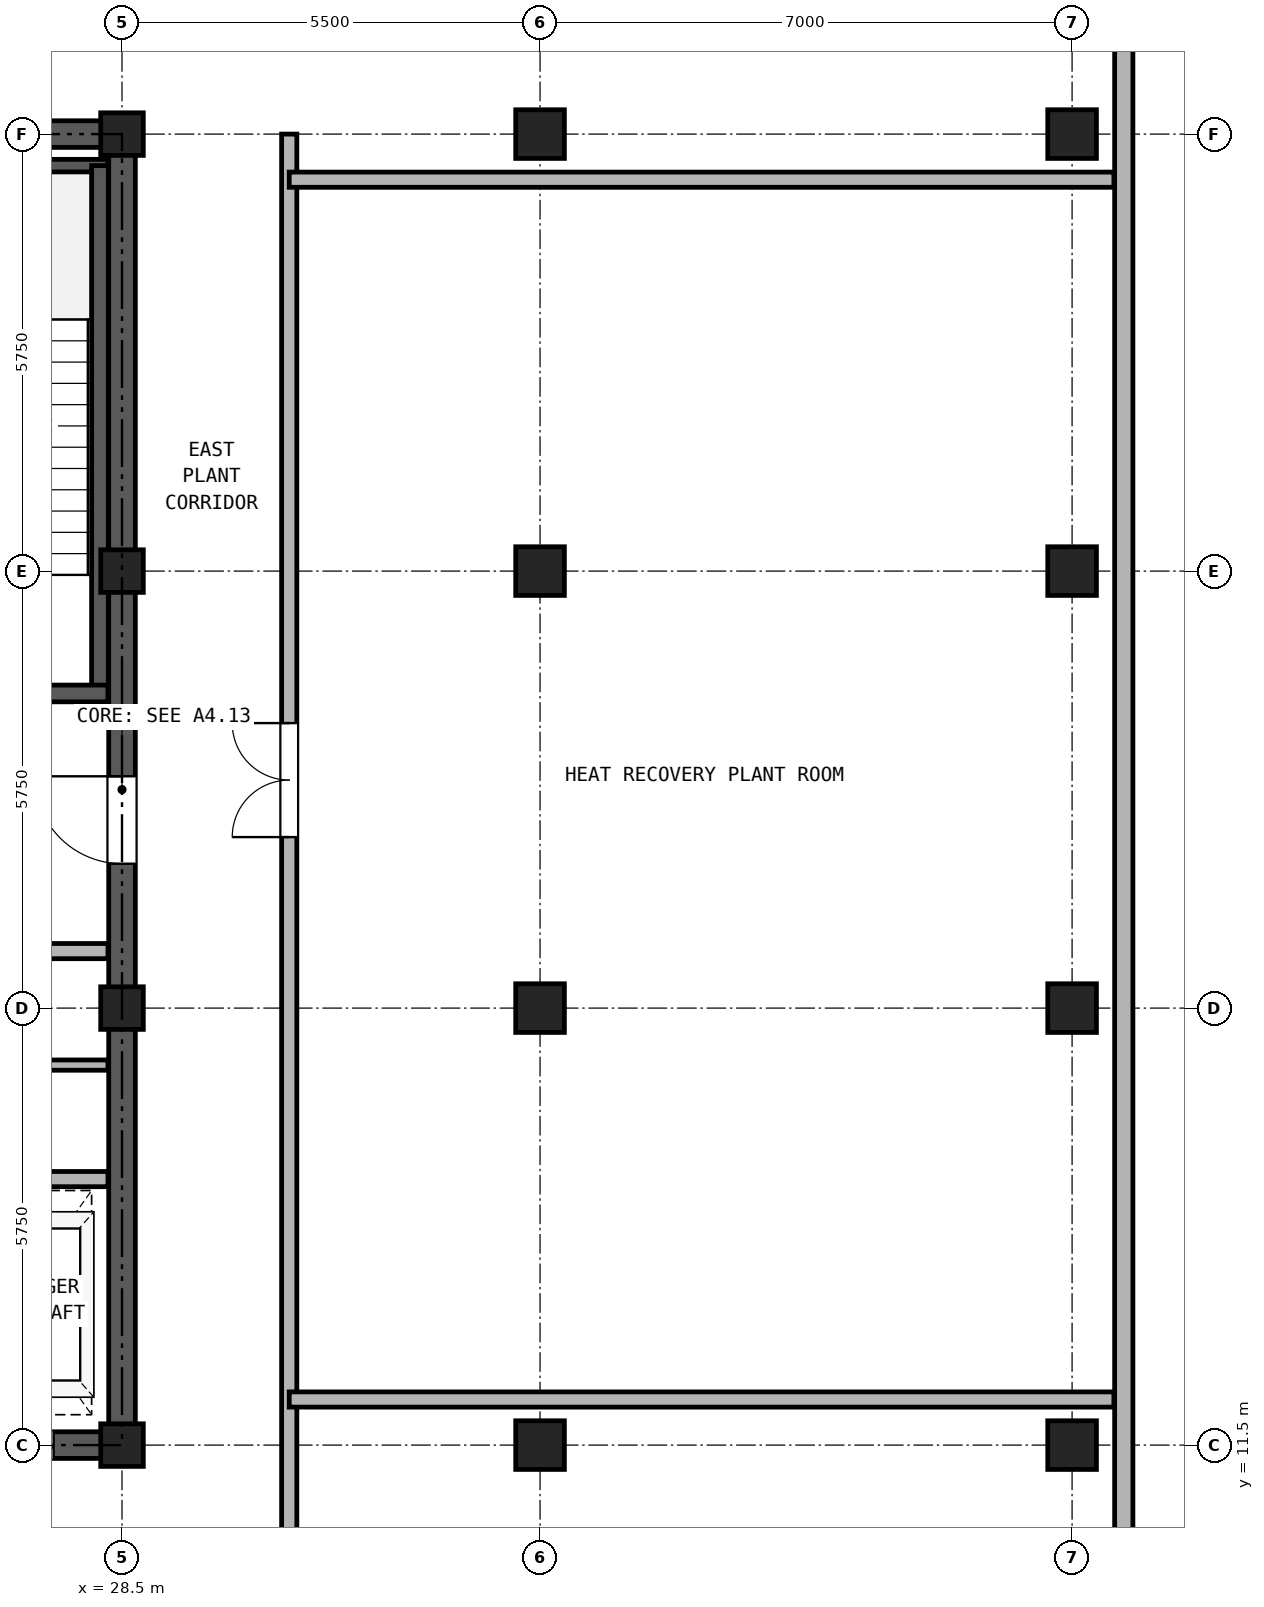
"""IFC4 building model, lengths in metres.
Left out: names, types, materials, properties, quantities, classifications, styles, units other than length and angle.
Written with IfcOpenShell. Run it as: python <this file> out.ifc"""

import sys

from ifc_helpers import new_model, si_unit, direction, frame, frame_2d, origin, origin_2d, place, context, subcontext, project, spatial, rectangle, hollow_rectangle, extrude, source, transform, mapped, element, fill, save


model = new_model("IFC4")
c1 = context("Model", 3, precision=1e-05, world=origin(), true_north=direction((0.0, 1.0)))
c2 = subcontext(c1, "Body", "Model", "MODEL_VIEW")
j1 = project(units=[si_unit("LENGTHUNIT", "METRE"), si_unit("PLANEANGLEUNIT", "RADIAN")], contexts=[c1])
p1 = place(None, origin())
s1 = spatial("IfcSite", under=j1, at=p1, CompositionType="ELEMENT")
p2 = place(p1, origin())
s2 = spatial("IfcBuilding", under=s1, at=p2, CompositionType="ELEMENT")
p3 = place(p2, frame((0.0, 0.0, 215.6)))
s3 = spatial("IfcBuildingStorey", under=s2, at=p3, CompositionType="ELEMENT", Elevation=215.6)
m1 = source(origin(), c2, "Body", "SweptSolid", [
    extrude(hollow_rectangle(XDim=0.64, YDim=0.64, WallThickness=0.035, at=origin_2d()), origin(), (0.0, 0.0, 1.0), 4.28),
])
for number, where, z_axis, x_axis in (
    (1, (41.0, 11.5, 0.0), (0.0, 0.0, 1.0), (1.0, 0.0, 0.0)),
    (2, (41.0, 17.25, 0.0), (0.0, 0.0, 1.0), (1.0, 0.0, 0.0)),
    (3, (41.0, 23.0, 0.0), (0.0, 0.0, 1.0), (1.0, 0.0, 0.0)),
    (4, (41.0, 28.75, 0.0), (0.0, 0.0, 1.0), (1.0, 0.0, 0.0)),
):
    element("IfcColumn", number, at=place(p3, frame(where, z_axis=z_axis, x_axis=x_axis)), inside=s3, PredefinedType="COLUMN", context=c2, shape_type="MappedRepresentation", body=[
        mapped(m1, transform((0.0, 0.0, 0.0), x_axis=(1.0, 0.0, 0.0), y_axis=(0.0, 1.0, 0.0), z_axis=(0.0, 0.0, 1.0), scale=1.0)),
    ])
m2 = source(origin(), c2, "Body", "SweptSolid", [
    extrude(hollow_rectangle(XDim=0.56, YDim=0.56, WallThickness=0.03, at=origin_2d()), origin(), (0.0, 0.0, 1.0), 4.28),
])
for number, where, z_axis, x_axis in (
    (5, (28.5, 11.5, 0.0), (0.0, 0.0, 1.0), (1.0, 0.0, 0.0)),
    (6, (28.5, 17.25, 0.0), (0.0, 0.0, 1.0), (1.0, 0.0, 0.0)),
    (7, (28.5, 23.0, 0.0), (0.0, 0.0, 1.0), (1.0, 0.0, 0.0)),
    (8, (28.5, 28.75, 0.0), (0.0, 0.0, 1.0), (1.0, 0.0, 0.0)),
):
    element("IfcColumn", number, at=place(p3, frame(where, z_axis=z_axis, x_axis=x_axis)), inside=s3, PredefinedType="COLUMN", context=c2, shape_type="MappedRepresentation", body=[
        mapped(m2, transform((0.0, 0.0, 0.0), x_axis=(1.0, 0.0, 0.0), y_axis=(0.0, 1.0, 0.0), z_axis=(0.0, 0.0, 1.0), scale=1.0)),
    ])
for number, where, z_axis, x_axis in (
    (9, (34.0, 11.5, 0.0), (0.0, 0.0, 1.0), (1.0, 0.0, 0.0)),
    (10, (34.0, 17.25, 0.0), (0.0, 0.0, 1.0), (1.0, 0.0, 0.0)),
    (11, (34.0, 23.0, 0.0), (0.0, 0.0, 1.0), (1.0, 0.0, 0.0)),
    (12, (34.0, 28.75, 0.0), (0.0, 0.0, 1.0), (1.0, 0.0, 0.0)),
):
    element("IfcColumn", number, at=place(p3, frame(where, z_axis=z_axis, x_axis=x_axis)), inside=s3, PredefinedType="COLUMN", context=c2, shape_type="MappedRepresentation", body=[
        mapped(m1, transform((0.0, 0.0, 0.0), x_axis=(1.0, 0.0, 0.0), y_axis=(0.0, 1.0, 0.0), z_axis=(0.0, 0.0, 1.0), scale=1.0)),
    ])
p4 = place(p3, frame((41.68, 3.5, 0.0), z_axis=(0.0, 0.0, 1.0), x_axis=(0.0, 1.0, 0.0)))
e13 = element("IfcWall", 13, at=p4, inside=s3, PredefinedType="SOLIDWALL", context=c2, shape_type="SweptSolid", body=[
    extrude(rectangle(XDim=28.3, YDim=0.24, at=frame_2d((14.15, 0.0))), origin(), (0.0, 0.0, 1.0), 4.28),
])
p5 = place(p3, frame((18.325, 11.5, 0.0), z_axis=(0.0, 0.0, 1.0), x_axis=(1.0, 0.0, 0.0)))
e14 = element("IfcWall", 14, at=p5, inside=s3, PredefinedType="SHEAR", context=c2, shape_type="SweptSolid", body=[
    extrude(rectangle(XDim=10.35, YDim=0.35, at=frame_2d((5.175, 0.0))), origin(), (0.0, 0.0, 1.0), 4.28),
])
p6 = place(p5, frame((1.775, 0.0, 0.0)))
e15 = element("IfcOpeningElement", 15, at=p6, cuts=e14, PredefinedType="OPENING", context=c2, shape_type="SweptSolid", body=[
    extrude(rectangle(XDim=0.95, YDim=2.15, at=frame_2d((0.475, 1.075))), frame((0.0, 0.185, 0.0), z_axis=(0.0, -1.0, 0.0), x_axis=(1.0, 0.0, 0.0)), (0.0, 0.0, 1.0), 0.37),
])
p7 = place(p5, frame((5.275, 0.0, 0.0)))
e16 = element("IfcOpeningElement", 16, at=p7, cuts=e14, PredefinedType="OPENING", context=c2, shape_type="SweptSolid", body=[
    extrude(rectangle(XDim=0.95, YDim=2.15, at=frame_2d((0.475, 1.075))), frame((0.0, 0.185, 0.0), z_axis=(0.0, -1.0, 0.0), x_axis=(1.0, 0.0, 0.0)), (0.0, 0.0, 1.0), 0.37),
])
p8 = place(p5, frame((8.175, 0.0, 0.0)))
e17 = element("IfcOpeningElement", 17, at=p8, cuts=e14, PredefinedType="OPENING", context=c2, shape_type="SweptSolid", body=[
    extrude(rectangle(XDim=1.1, YDim=2.25, at=frame_2d((0.55, 1.125))), frame((0.0, 0.185, 0.0), z_axis=(0.0, -1.0, 0.0), x_axis=(1.0, 0.0, 0.0)), (0.0, 0.0, 1.0), 0.37),
])
p9 = place(p3, frame((18.325, 28.75, 0.0), z_axis=(0.0, 0.0, 1.0), x_axis=(1.0, 0.0, 0.0)))
e18 = element("IfcWall", 18, at=p9, inside=s3, PredefinedType="SHEAR", context=c2, shape_type="SweptSolid", body=[
    extrude(rectangle(XDim=10.35, YDim=0.35, at=frame_2d((5.175, 0.0))), origin(), (0.0, 0.0, 1.0), 4.28),
])
p10 = place(p9, frame((4.055, 0.0, 0.0)))
e19 = element("IfcOpeningElement", 19, at=p10, cuts=e18, PredefinedType="OPENING", context=c2, shape_type="SweptSolid", body=[
    extrude(rectangle(XDim=0.9, YDim=2.05, at=frame_2d((0.45, 1.025))), frame((0.0, 0.185, 0.0), z_axis=(0.0, -1.0, 0.0), x_axis=(1.0, 0.0, 0.0)), (0.0, 0.0, 1.0), 0.37),
])
p11 = place(p9, frame((5.595, 0.0, 0.0)))
e20 = element("IfcOpeningElement", 20, at=p11, cuts=e18, PredefinedType="OPENING", context=c2, shape_type="SweptSolid", body=[
    extrude(rectangle(XDim=0.9, YDim=2.05, at=frame_2d((0.45, 1.025))), frame((0.0, 0.185, 0.0), z_axis=(0.0, -1.0, 0.0), x_axis=(1.0, 0.0, 0.0)), (0.0, 0.0, 1.0), 0.37),
])
p12 = place(p3, frame((28.5, 11.675, 0.0), z_axis=(0.0, 0.0, 1.0), x_axis=(0.0, 1.0, 0.0)))
e21 = element("IfcWall", 21, at=p12, inside=s3, PredefinedType="SHEAR", context=c2, shape_type="SweptSolid", body=[
    extrude(rectangle(XDim=16.9, YDim=0.35, at=frame_2d((8.45, 0.0))), origin(), (0.0, 0.0, 1.0), 4.28),
])
p13 = place(p12, frame((7.475, 0.0, 0.0)))
e22 = element("IfcOpeningElement", 22, at=p13, cuts=e21, PredefinedType="OPENING", context=c2, shape_type="SweptSolid", body=[
    extrude(rectangle(XDim=1.15, YDim=2.2, at=frame_2d((0.575, 1.1))), frame((0.0, 0.185, 0.0), z_axis=(0.0, -1.0, 0.0), x_axis=(1.0, 0.0, 0.0)), (0.0, 0.0, 1.0), 0.37),
])
p14 = place(p3, frame((25.13, 28.335, 0.0), z_axis=(0.0, 0.0, 1.0), x_axis=(1.0, 0.0, 0.0)))
e23 = element("IfcWall", 23, at=p14, inside=s3, PredefinedType="PARTITIONING", context=c2, shape_type="SweptSolid", body=[
    extrude(rectangle(XDim=3.185, YDim=0.165, at=frame_2d((1.593, 0.0))), origin(), (0.0, 0.0, 1.0), 4.28),
])
p15 = place(p3, frame((28.21, 21.39, 0.0), z_axis=(0.0, 0.0, 1.0), x_axis=(0.0, 1.0, 0.0)))
e24 = element("IfcWall", 24, at=p15, inside=s3, PredefinedType="SOLIDWALL", context=c2, shape_type="SweptSolid", body=[
    extrude(rectangle(XDim=6.945, YDim=0.22, at=frame_2d((3.473, 0.0))), origin(), (0.0, 0.0, 1.0), 4.28),
])
p16 = place(p3, frame((25.13, 21.39, 0.0), z_axis=(0.0, 0.0, 1.0), x_axis=(1.0, 0.0, 0.0)))
e25 = element("IfcWall", 25, at=p16, inside=s3, PredefinedType="SOLIDWALL", context=c2, shape_type="SweptSolid", body=[
    extrude(rectangle(XDim=3.185, YDim=0.22, at=frame_2d((1.593, 0.0))), origin(), (0.0, 0.0, 1.0), 4.28),
])
p17 = place(p16, frame((0.92, 0.0, 0.0)))
e26 = element("IfcOpeningElement", 26, at=p17, cuts=e25, PredefinedType="OPENING", context=c2, shape_type="SweptSolid", body=[
    extrude(rectangle(XDim=1.15, YDim=2.2, at=frame_2d((0.575, 1.1))), frame((0.0, 0.12, 0.0), z_axis=(0.0, -1.0, 0.0), x_axis=(1.0, 0.0, 0.0)), (0.0, 0.0, 1.0), 0.24),
])
p18 = place(p3, frame((18.685, 18.0, 0.0), z_axis=(0.0, 0.0, 1.0), x_axis=(1.0, 0.0, 0.0)))
e27 = element("IfcWall", 27, at=p18, inside=s3, PredefinedType="PARTITIONING", context=c2, shape_type="SweptSolid", body=[
    extrude(rectangle(XDim=9.63, YDim=0.2, at=frame_2d((4.815, 0.0))), origin(), (0.0, 0.0, 1.0), 4.28),
])
p19 = place(p18, frame((0.565, 0.0, 0.0)))
e28 = element("IfcOpeningElement", 28, at=p19, cuts=e27, PredefinedType="OPENING", context=c2, shape_type="SweptSolid", body=[
    extrude(rectangle(XDim=1.3, YDim=2.3, at=frame_2d((0.65, 1.15))), frame((0.0, 0.11, 0.0), z_axis=(0.0, -1.0, 0.0), x_axis=(1.0, 0.0, 0.0)), (0.0, 0.0, 1.0), 0.22),
])
p20 = place(p18, frame((2.665, 0.0, 0.0)))
e29 = element("IfcOpeningElement", 29, at=p20, cuts=e27, PredefinedType="OPENING", context=c2, shape_type="SweptSolid", body=[
    extrude(rectangle(XDim=1.3, YDim=2.3, at=frame_2d((0.65, 1.15))), frame((0.0, 0.11, 0.0), z_axis=(0.0, -1.0, 0.0), x_axis=(1.0, 0.0, 0.0)), (0.0, 0.0, 1.0), 0.22),
])
p21 = place(p18, frame((7.165, 0.0, 0.0)))
e30 = element("IfcOpeningElement", 30, at=p21, cuts=e27, PredefinedType="OPENING", context=c2, shape_type="SweptSolid", body=[
    extrude(rectangle(XDim=1.0, YDim=2.15, at=frame_2d((0.5, 1.075))), frame((0.0, 0.11, 0.0), z_axis=(0.0, -1.0, 0.0), x_axis=(1.0, 0.0, 0.0)), (0.0, 0.0, 1.0), 0.22),
])
p22 = place(p3, frame((18.685, 15.0, 0.0), z_axis=(0.0, 0.0, 1.0), x_axis=(1.0, 0.0, 0.0)))
e31 = element("IfcWall", 31, at=p22, inside=s3, PredefinedType="PARTITIONING", context=c2, shape_type="SweptSolid", body=[
    extrude(rectangle(XDim=9.63, YDim=0.2, at=frame_2d((4.815, 0.0))), origin(), (0.0, 0.0, 1.0), 4.28),
])
p23 = place(p3, frame((23.3, 16.5, 0.0), z_axis=(0.0, 0.0, 1.0), x_axis=(1.0, 0.0, 0.0)))
e32 = element("IfcWall", 32, at=p23, inside=s3, PredefinedType="PARTITIONING", context=c2, shape_type="SweptSolid", body=[
    extrude(rectangle(XDim=5.015, YDim=0.135, at=frame_2d((2.507, 0.0))), origin(), (0.0, 0.0, 1.0), 4.28),
])
p24 = place(p23, frame((2.55, 0.0, 0.0)))
e33 = element("IfcOpeningElement", 33, at=p24, cuts=e32, PredefinedType="OPENING", context=c2, shape_type="SweptSolid", body=[
    extrude(rectangle(XDim=0.9, YDim=2.05, at=frame_2d((0.45, 1.025))), frame((0.0, 0.077, 0.0), z_axis=(0.0, -1.0, 0.0), x_axis=(1.0, 0.0, 0.0)), (0.0, 0.0, 1.0), 0.155),
])
p25 = place(p3, frame((30.7, 8.9, 0.0), z_axis=(0.0, 0.0, 1.0), x_axis=(0.0, 1.0, 0.0)))
e34 = element("IfcWall", 34, at=p25, inside=s3, PredefinedType="PARTITIONING", context=c2, shape_type="SweptSolid", body=[
    extrude(rectangle(XDim=19.85, YDim=0.2, at=frame_2d((9.925, 0.0))), origin(), (0.0, 0.0, 1.0), 4.28),
])
p26 = place(p25, frame((10.6, 0.0, 0.0)))
e35 = element("IfcOpeningElement", 35, at=p26, cuts=e34, PredefinedType="OPENING", context=c2, shape_type="SweptSolid", body=[
    extrude(rectangle(XDim=1.5, YDim=2.25, at=frame_2d((0.75, 1.125))), frame((0.0, 0.11, 0.0), z_axis=(0.0, -1.0, 0.0), x_axis=(1.0, 0.0, 0.0)), (0.0, 0.0, 1.0), 0.22),
])
for number, where, z_axis, x_axis in (
    (36, (30.7, 12.1, 0.0), (0.0, 0.0, 1.0), (1.0, 0.0, 0.0)),
    (37, (30.7, 28.15, 0.0), (0.0, 0.0, 1.0), (1.0, 0.0, 0.0)),
):
    element("IfcWall", number, at=place(p3, frame(where, z_axis=z_axis, x_axis=x_axis)), inside=s3, PredefinedType="PARTITIONING", context=c2, shape_type="SweptSolid", body=[
        extrude(rectangle(XDim=10.85, YDim=0.2, at=frame_2d((5.425, 0.0))), origin(), (0.0, 0.0, 1.0), 4.28),
    ])
p27 = place(p13, origin())
e38 = element("IfcDoor", 38, at=p27, inside=s3, OperationType="SINGLE_SWING_RIGHT", PredefinedType="DOOR", context=c2, shape_type="SweptSolid", body=[
    extrude(rectangle(XDim=1.15, YDim=2.2, at=frame_2d((0.575, 1.1))), frame((0.0, 0.025, 0.0), z_axis=(0.0, -1.0, 0.0), x_axis=(1.0, 0.0, 0.0)), (0.0, 0.0, 1.0), 0.05),
])
fill(e22, e38)
p28 = place(p8, frame((1.1, 0.0, 0.0), z_axis=(0.0, 0.0, 1.0), x_axis=(-1.0, 0.0, 0.0)))
e39 = element("IfcDoor", 39, at=p28, inside=s3, OperationType="DOUBLE_DOOR_SLIDING", PredefinedType="DOOR", context=c2, shape_type="SweptSolid", body=[
    extrude(rectangle(XDim=1.1, YDim=2.25, at=frame_2d((0.55, 1.125))), frame((0.0, 0.025, 0.0), z_axis=(0.0, -1.0, 0.0), x_axis=(1.0, 0.0, 0.0)), (0.0, 0.0, 1.0), 0.05),
])
fill(e17, e39)
p29 = place(p26, origin())
e40 = element("IfcDoor", 40, at=p29, inside=s3, OperationType="DOUBLE_DOOR_SINGLE_SWING", PredefinedType="DOOR", context=c2, shape_type="SweptSolid", body=[
    extrude(rectangle(XDim=1.5, YDim=2.25, at=frame_2d((0.75, 1.125))), frame((0.0, 0.025, 0.0), z_axis=(0.0, -1.0, 0.0), x_axis=(1.0, 0.0, 0.0)), (0.0, 0.0, 1.0), 0.05),
])
fill(e35, e40)
save(model, sys.argv[1])
